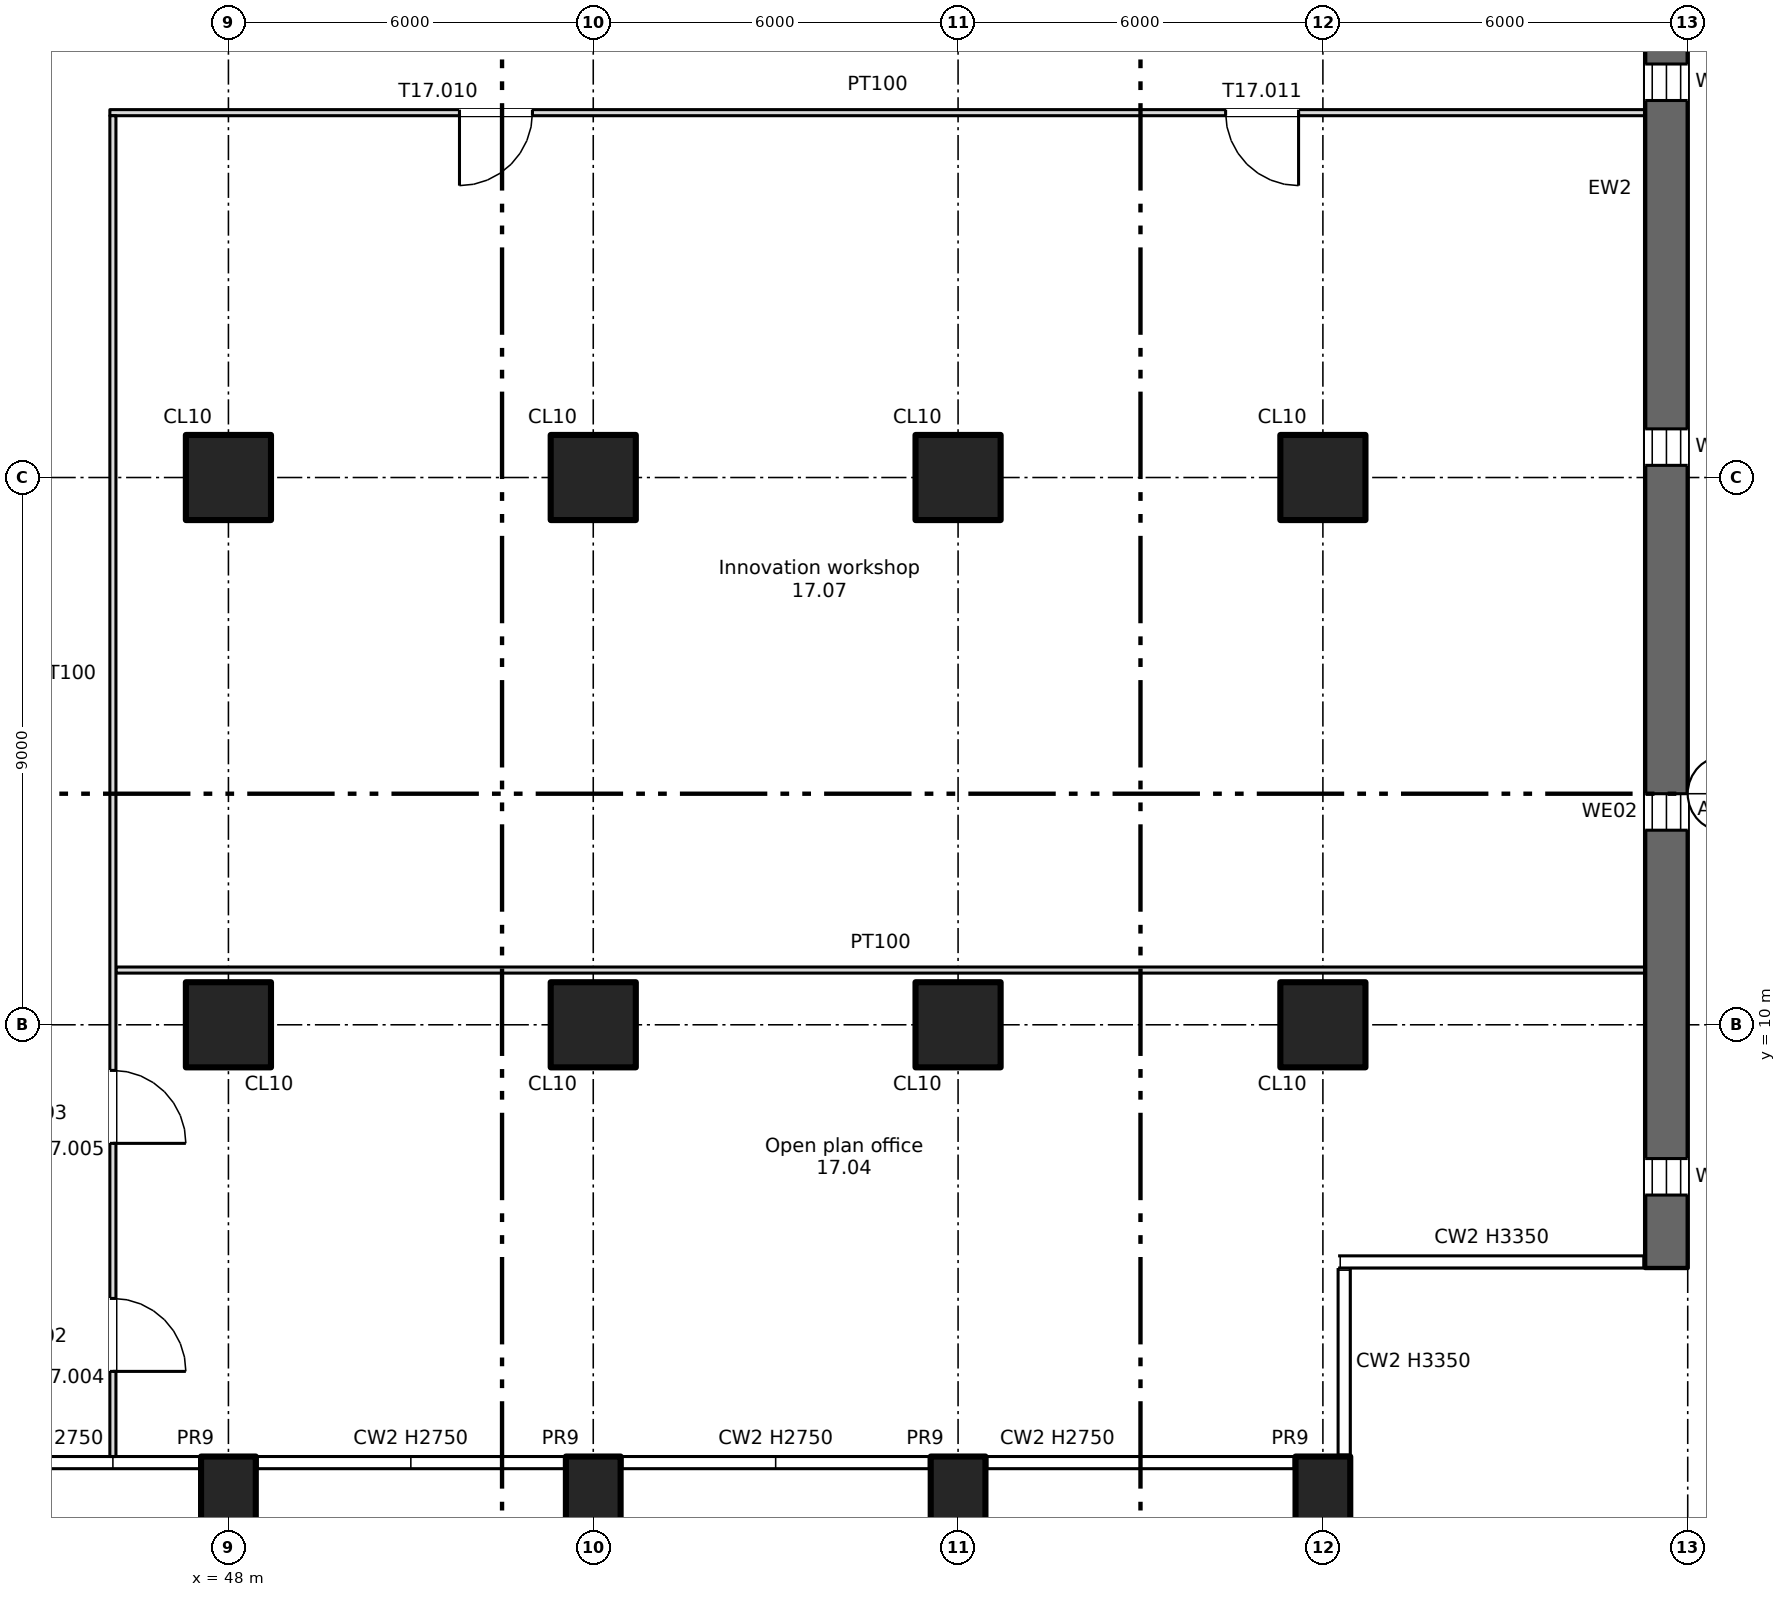
"""IFC4 building model, lengths in metres.
Left out: names, types, materials, properties, quantities, classifications, styles, units other than length and angle.
Written with IfcOpenShell. Run it as: python <this file> out.ifc"""

import sys

from ifc_helpers import new_model, si_unit, direction, frame, frame_2d, origin, origin_2d, place, context, subcontext, project, spatial, rectangle, extrude, element, fill, save


model = new_model("IFC4")
c1 = context("Model", 3, precision=1e-05, world=origin(), true_north=direction((0.0, 1.0)))
c2 = subcontext(c1, "Body", "Model", "MODEL_VIEW")
j1 = project(units=[si_unit("LENGTHUNIT", "METRE"), si_unit("PLANEANGLEUNIT", "RADIAN")], contexts=[c1])
p1 = place(None, origin())
s1 = spatial("IfcSite", under=j1, at=p1, CompositionType="ELEMENT")
p2 = place(p1, origin())
s2 = spatial("IfcBuilding", under=s1, at=p2, CompositionType="ELEMENT")
p3 = place(p2, frame((0.0, 0.0, 110.0)))
s3 = spatial("IfcBuildingStorey", under=s2, at=p3, CompositionType="ELEMENT", Elevation=110.0)
for number, where, z_axis, x_axis in (
    (1, (48.0, 2.2, -0.4), (0.0, 0.0, 1.0), (1.0, 0.0, 0.0)),
    (2, (54.0, 2.2, -0.4), (0.0, 0.0, 1.0), (1.0, 0.0, 0.0)),
    (3, (60.0, 2.2, -0.4), (0.0, 0.0, 1.0), (1.0, 0.0, 0.0)),
    (4, (66.0, 2.2, -0.4), (0.0, 0.0, 1.0), (1.0, 0.0, 0.0)),
):
    element("IfcColumn", number, at=place(p3, frame(where, z_axis=z_axis, x_axis=x_axis)), inside=s3, PredefinedType="COLUMN", context=c2, shape_type="SweptSolid", body=[
        extrude(rectangle(XDim=0.9, YDim=1.4, at=origin_2d()), origin(), (0.0, 0.0, 1.0), 3.75),
    ])
for number, where, z_axis, x_axis in (
    (5, (48.0, 10.0, 0.0), (0.0, 0.0, 1.0), (1.0, 0.0, 0.0)),
    (6, (48.0, 19.0, 0.0), (0.0, 0.0, 1.0), (1.0, 0.0, 0.0)),
    (7, (54.0, 10.0, 0.0), (0.0, 0.0, 1.0), (1.0, 0.0, 0.0)),
    (8, (54.0, 19.0, 0.0), (0.0, 0.0, 1.0), (1.0, 0.0, 0.0)),
    (9, (60.0, 10.0, 0.0), (0.0, 0.0, 1.0), (1.0, 0.0, 0.0)),
    (10, (60.0, 19.0, 0.0), (0.0, 0.0, 1.0), (1.0, 0.0, 0.0)),
    (11, (66.0, 10.0, 0.0), (0.0, 0.0, 1.0), (1.0, 0.0, 0.0)),
    (12, (66.0, 19.0, 0.0), (0.0, 0.0, 1.0), (1.0, 0.0, 0.0)),
):
    element("IfcColumn", number, at=place(p3, frame(where, z_axis=z_axis, x_axis=x_axis)), inside=s3, PredefinedType="COLUMN", context=c2, shape_type="SweptSolid", body=[
        extrude(rectangle(XDim=1.4, YDim=1.4, at=origin_2d()), origin(), (0.0, 0.0, 1.0), 3.35),
    ])
p4 = place(p3, frame((71.65, 6.0, 0.0), z_axis=(0.0, 0.0, 1.0), x_axis=(0.0, 1.0, 0.0)))
e13 = element("IfcWall", 13, at=p4, inside=s3, PredefinedType="SHEAR", context=c2, shape_type="SweptSolid", body=[
    extrude(rectangle(XDim=35.5, YDim=0.7, at=frame_2d((17.75, 0.0))), origin(), (0.0, 0.0, 1.0), 3.35),
])
p5 = place(p4, frame((1.2, 0.0, 0.6)))
e14 = element("IfcOpeningElement", 14, at=p5, cuts=e13, PredefinedType="OPENING", context=c2, shape_type="SweptSolid", body=[
    extrude(rectangle(XDim=0.6, YDim=2.4, at=frame_2d((0.3, 1.2))), frame((0.0, 0.36, 0.0), z_axis=(0.0, -1.0, 0.0), x_axis=(1.0, 0.0, 0.0)), (0.0, 0.0, 1.0), 0.72),
])
p6 = place(p4, frame((7.2, 0.0, 0.6)))
e15 = element("IfcOpeningElement", 15, at=p6, cuts=e13, PredefinedType="OPENING", context=c2, shape_type="SweptSolid", body=[
    extrude(rectangle(XDim=0.6, YDim=2.4, at=frame_2d((0.3, 1.2))), frame((0.0, 0.36, 0.0), z_axis=(0.0, -1.0, 0.0), x_axis=(1.0, 0.0, 0.0)), (0.0, 0.0, 1.0), 0.72),
])
p7 = place(p4, frame((13.2, 0.0, 0.6)))
e16 = element("IfcOpeningElement", 16, at=p7, cuts=e13, PredefinedType="OPENING", context=c2, shape_type="SweptSolid", body=[
    extrude(rectangle(XDim=0.6, YDim=2.4, at=frame_2d((0.3, 1.2))), frame((0.0, 0.36, 0.0), z_axis=(0.0, -1.0, 0.0), x_axis=(1.0, 0.0, 0.0)), (0.0, 0.0, 1.0), 0.72),
])
p8 = place(p4, frame((19.2, 0.0, 0.6)))
e17 = element("IfcOpeningElement", 17, at=p8, cuts=e13, PredefinedType="OPENING", context=c2, shape_type="SweptSolid", body=[
    extrude(rectangle(XDim=0.6, YDim=2.4, at=frame_2d((0.3, 1.2))), frame((0.0, 0.36, 0.0), z_axis=(0.0, -1.0, 0.0), x_axis=(1.0, 0.0, 0.0)), (0.0, 0.0, 1.0), 0.72),
])
p9 = place(p4, frame((25.2, 0.0, 0.6)))
e18 = element("IfcOpeningElement", 18, at=p9, cuts=e13, PredefinedType="OPENING", context=c2, shape_type="SweptSolid", body=[
    extrude(rectangle(XDim=0.6, YDim=2.4, at=frame_2d((0.3, 1.2))), frame((0.0, 0.36, 0.0), z_axis=(0.0, -1.0, 0.0), x_axis=(1.0, 0.0, 0.0)), (0.0, 0.0, 1.0), 0.72),
])
p10 = place(p4, frame((31.2, 0.0, 0.6)))
e19 = element("IfcOpeningElement", 19, at=p10, cuts=e13, PredefinedType="OPENING", context=c2, shape_type="SweptSolid", body=[
    extrude(rectangle(XDim=0.6, YDim=2.4, at=frame_2d((0.3, 1.2))), frame((0.0, 0.36, 0.0), z_axis=(0.0, -1.0, 0.0), x_axis=(1.0, 0.0, 0.0)), (0.0, 0.0, 1.0), 0.72),
])
p11 = place(p3, frame((46.15, 10.9, 0.0), z_axis=(0.0, 0.0, 1.0), x_axis=(1.0, 0.0, 0.0)))
e20 = element("IfcWall", 20, at=p11, inside=s3, PredefinedType="PARTITIONING", context=c2, shape_type="SweptSolid", body=[
    extrude(rectangle(XDim=25.15, YDim=0.1, at=frame_2d((12.575, 0.0))), origin(), (0.0, 0.0, 1.0), 3.35),
])
p12 = place(p3, frame((46.05, 25.0, 0.0), z_axis=(0.0, 0.0, 1.0), x_axis=(1.0, 0.0, 0.0)))
e21 = element("IfcWall", 21, at=p12, inside=s3, PredefinedType="PARTITIONING", context=c2, shape_type="SweptSolid", body=[
    extrude(rectangle(XDim=25.25, YDim=0.1, at=frame_2d((12.625, 0.0))), origin(), (0.0, 0.0, 1.0), 3.35),
])
p13 = place(p12, frame((5.75, 0.0, 0.0)))
e22 = element("IfcOpeningElement", 22, at=p13, cuts=e21, PredefinedType="OPENING", context=c2, shape_type="SweptSolid", body=[
    extrude(rectangle(XDim=1.2, YDim=2.1, at=frame_2d((0.6, 1.05))), frame((0.0, 0.06, 0.0), z_axis=(0.0, -1.0, 0.0), x_axis=(1.0, 0.0, 0.0)), (0.0, 0.0, 1.0), 0.12),
])
p14 = place(p12, frame((18.35, 0.0, 0.0)))
e23 = element("IfcOpeningElement", 23, at=p14, cuts=e21, PredefinedType="OPENING", context=c2, shape_type="SweptSolid", body=[
    extrude(rectangle(XDim=1.2, YDim=2.1, at=frame_2d((0.6, 1.05))), frame((0.0, 0.06, 0.0), z_axis=(0.0, -1.0, 0.0), x_axis=(1.0, 0.0, 0.0)), (0.0, 0.0, 1.0), 0.12),
])
p15 = place(p3, frame((46.1, 2.9, 0.0), z_axis=(0.0, 0.0, 1.0), x_axis=(0.0, 1.0, 0.0)))
e24 = element("IfcWall", 24, at=p15, inside=s3, PredefinedType="PARTITIONING", context=c2, shape_type="SweptSolid", body=[
    extrude(rectangle(XDim=22.05, YDim=0.1, at=frame_2d((11.025, 0.0))), origin(), (0.0, 0.0, 1.0), 3.35),
])
p16 = place(p15, frame((1.4, 0.0, 0.0)))
e25 = element("IfcOpeningElement", 25, at=p16, cuts=e24, PredefinedType="OPENING", context=c2, shape_type="SweptSolid", body=[
    extrude(rectangle(XDim=1.2, YDim=2.1, at=frame_2d((0.6, 1.05))), frame((0.0, 0.06, 0.0), z_axis=(0.0, -1.0, 0.0), x_axis=(1.0, 0.0, 0.0)), (0.0, 0.0, 1.0), 0.12),
])
p17 = place(p15, frame((5.15, 0.0, 0.0)))
e26 = element("IfcOpeningElement", 26, at=p17, cuts=e24, PredefinedType="OPENING", context=c2, shape_type="SweptSolid", body=[
    extrude(rectangle(XDim=1.2, YDim=2.1, at=frame_2d((0.6, 1.05))), frame((0.0, 0.06, 0.0), z_axis=(0.0, -1.0, 0.0), x_axis=(1.0, 0.0, 0.0)), (0.0, 0.0, 1.0), 0.12),
])
p18 = place(p5, origin())
e27 = element("IfcWindow", 27, at=p18, inside=s3, PartitioningType="SINGLE_PANEL", PredefinedType="WINDOW", context=c2, shape_type="SweptSolid", body=[
    extrude(rectangle(XDim=0.6, YDim=2.4, at=frame_2d((0.3, 1.2))), frame((0.0, 0.03, 0.0), z_axis=(0.0, -1.0, 0.0), x_axis=(1.0, 0.0, 0.0)), (0.0, 0.0, 1.0), 0.06),
])
fill(e14, e27)
p19 = place(p6, origin())
e28 = element("IfcWindow", 28, at=p19, inside=s3, PartitioningType="SINGLE_PANEL", PredefinedType="WINDOW", context=c2, shape_type="SweptSolid", body=[
    extrude(rectangle(XDim=0.6, YDim=2.4, at=frame_2d((0.3, 1.2))), frame((0.0, 0.03, 0.0), z_axis=(0.0, -1.0, 0.0), x_axis=(1.0, 0.0, 0.0)), (0.0, 0.0, 1.0), 0.06),
])
fill(e15, e28)
p20 = place(p7, origin())
e29 = element("IfcWindow", 29, at=p20, inside=s3, PartitioningType="SINGLE_PANEL", PredefinedType="WINDOW", context=c2, shape_type="SweptSolid", body=[
    extrude(rectangle(XDim=0.6, YDim=2.4, at=frame_2d((0.3, 1.2))), frame((0.0, 0.03, 0.0), z_axis=(0.0, -1.0, 0.0), x_axis=(1.0, 0.0, 0.0)), (0.0, 0.0, 1.0), 0.06),
])
fill(e16, e29)
p21 = place(p8, origin())
e30 = element("IfcWindow", 30, at=p21, inside=s3, PartitioningType="SINGLE_PANEL", PredefinedType="WINDOW", context=c2, shape_type="SweptSolid", body=[
    extrude(rectangle(XDim=0.6, YDim=2.4, at=frame_2d((0.3, 1.2))), frame((0.0, 0.03, 0.0), z_axis=(0.0, -1.0, 0.0), x_axis=(1.0, 0.0, 0.0)), (0.0, 0.0, 1.0), 0.06),
])
fill(e17, e30)
p22 = place(p16, origin())
e31 = element("IfcDoor", 31, at=p22, inside=s3, OperationType="SINGLE_SWING_LEFT", PredefinedType="DOOR", context=c2, shape_type="SweptSolid", body=[
    extrude(rectangle(XDim=1.2, YDim=2.1, at=frame_2d((0.6, 1.05))), frame((0.0, 0.025, 0.0), z_axis=(0.0, -1.0, 0.0), x_axis=(1.0, 0.0, 0.0)), (0.0, 0.0, 1.0), 0.05),
])
fill(e25, e31)
p23 = place(p17, origin())
e32 = element("IfcDoor", 32, at=p23, inside=s3, OperationType="SINGLE_SWING_LEFT", PredefinedType="DOOR", context=c2, shape_type="SweptSolid", body=[
    extrude(rectangle(XDim=1.2, YDim=2.1, at=frame_2d((0.6, 1.05))), frame((0.0, 0.025, 0.0), z_axis=(0.0, -1.0, 0.0), x_axis=(1.0, 0.0, 0.0)), (0.0, 0.0, 1.0), 0.05),
])
fill(e26, e32)
p24 = place(p13, origin())
e33 = element("IfcDoor", 33, at=p24, inside=s3, OperationType="SINGLE_SWING_LEFT", PredefinedType="DOOR", context=c2, shape_type="SweptSolid", body=[
    extrude(rectangle(XDim=1.2, YDim=2.1, at=frame_2d((0.6, 1.05))), frame((0.0, 0.025, 0.0), z_axis=(0.0, -1.0, 0.0), x_axis=(1.0, 0.0, 0.0)), (0.0, 0.0, 1.0), 0.05),
])
fill(e22, e33)
p25 = place(p14, origin())
e34 = element("IfcDoor", 34, at=p25, inside=s3, OperationType="SINGLE_SWING_RIGHT", PredefinedType="DOOR", context=c2, shape_type="SweptSolid", body=[
    extrude(rectangle(XDim=1.2, YDim=2.1, at=frame_2d((0.6, 1.05))), frame((0.0, 0.025, 0.0), z_axis=(0.0, -1.0, 0.0), x_axis=(1.0, 0.0, 0.0)), (0.0, 0.0, 1.0), 0.05),
])
fill(e23, e34)
save(model, sys.argv[1])
